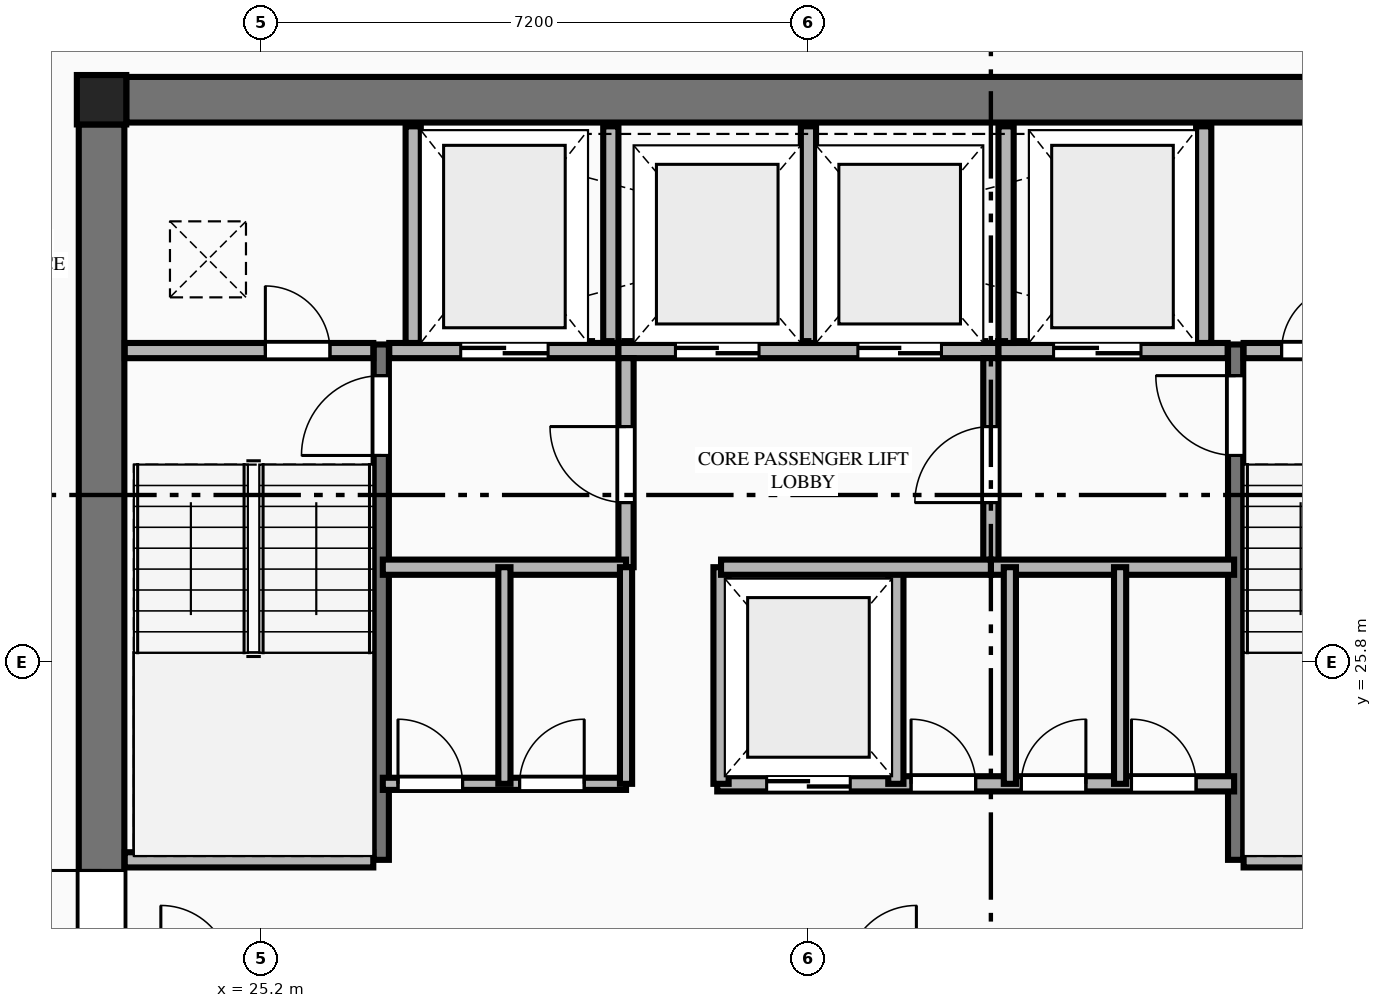
"""IFC4 building model, lengths in metres.
Left out: names, types, materials, properties, quantities, classifications, styles, units other than length and angle.
Written with IfcOpenShell. Run it as: python <this file> out.ifc"""

import sys

from ifc_helpers import new_model, si_unit, direction, frame, frame_2d, origin, origin_2d, place, context, subcontext, project, spatial, rectangle, extrude, element, fill, save


model = new_model("IFC4")
c1 = context("Model", 3, precision=1e-05, world=origin(), true_north=direction((0.0, 1.0)))
c2 = subcontext(c1, "Body", "Model", "MODEL_VIEW")
j1 = project(units=[si_unit("LENGTHUNIT", "METRE"), si_unit("PLANEANGLEUNIT", "RADIAN")], contexts=[c1])
p1 = place(None, origin())
s1 = spatial("IfcSite", under=j1, at=p1, CompositionType="ELEMENT")
p2 = place(p1, origin())
s2 = spatial("IfcBuilding", under=s1, at=p2, CompositionType="ELEMENT")
p3 = place(p2, frame((0.0, 0.0, 214.5)))
s3 = spatial("IfcBuildingStorey", under=s2, at=p3, CompositionType="ELEMENT", Elevation=214.5)
p4 = place(p3, frame((23.1, 33.2, 0.0), z_axis=(0.0, 0.0, 1.0), x_axis=(1.0, 0.0, 0.0)))
e1 = element("IfcColumn", 1, at=p4, inside=s3, PredefinedType="COLUMN", context=c2, shape_type="SweptSolid", body=[
    extrude(rectangle(XDim=0.65, YDim=0.65, at=origin_2d()), origin(), (0.0, 0.0, 1.0), 3.55),
])
p5 = place(p3, frame((23.425, 33.2, 0.0), z_axis=(0.0, 0.0, 1.0), x_axis=(1.0, 0.0, 0.0)))
e2 = element("IfcWall", 2, at=p5, inside=s3, PredefinedType="SHEAR", context=c2, shape_type="SweptSolid", body=[
    extrude(rectangle(XDim=17.95, YDim=0.6, at=frame_2d((8.975, 0.0))), origin(), (0.0, 0.0, 1.0), 3.35),
])
p6 = place(p3, frame((23.1, 18.925, 0.0), z_axis=(0.0, 0.0, 1.0), x_axis=(0.0, 1.0, 0.0)))
e3 = element("IfcWall", 3, at=p6, inside=s3, PredefinedType="SHEAR", context=c2, shape_type="SweptSolid", body=[
    extrude(rectangle(XDim=13.95, YDim=0.6, at=frame_2d((6.975, 0.0))), origin(), (0.0, 0.0, 1.0), 3.35),
])
p7 = place(p6, frame((2.915, 0.0, 0.0)))
e4 = element("IfcOpeningElement", 4, at=p7, cuts=e3, PredefinedType="OPENING", context=c2, shape_type="SweptSolid", body=[
    extrude(rectangle(XDim=1.22, YDim=2.25, at=frame_2d((0.61, 1.125))), frame((0.0, 0.31, 0.0), z_axis=(0.0, -1.0, 0.0), x_axis=(1.0, 0.0, 0.0)), (0.0, 0.0, 1.0), 0.62),
])
p8 = place(p3, frame((26.78, 23.2, 0.0), z_axis=(0.0, 0.0, 1.0), x_axis=(0.0, 1.0, 0.0)))
e5 = element("IfcWall", 5, at=p8, inside=s3, PredefinedType="SHEAR", context=c2, shape_type="SweptSolid", body=[
    extrude(rectangle(XDim=6.78, YDim=0.2, at=frame_2d((3.39, 0.0))), origin(), (0.0, 0.0, 1.0), 3.55),
])
p9 = place(p8, frame((5.32, 0.0, 0.0)))
e6 = element("IfcOpeningElement", 6, at=p9, cuts=e5, PredefinedType="OPENING", context=c2, shape_type="SweptSolid", body=[
    extrude(rectangle(XDim=1.05, YDim=2.15, at=frame_2d((0.525, 1.075))), frame((0.0, 0.11, 0.0), z_axis=(0.0, -1.0, 0.0), x_axis=(1.0, 0.0, 0.0)), (0.0, 0.0, 1.0), 0.22),
])
p10 = place(p3, frame((23.405, 23.2, 0.0), z_axis=(0.0, 0.0, 1.0), x_axis=(1.0, 0.0, 0.0)))
e7 = element("IfcWall", 7, at=p10, inside=s3, PredefinedType="PLUMBINGWALL", context=c2, shape_type="SweptSolid", body=[
    extrude(rectangle(XDim=3.27, YDim=0.2, at=frame_2d((1.635, 0.0))), origin(), (0.0, 0.0, 1.0), 3.35),
])
p11 = place(p3, frame((38.02, 23.2, 0.0), z_axis=(0.0, 0.0, 1.0), x_axis=(0.0, 1.0, 0.0)))
e8 = element("IfcWall", 8, at=p11, inside=s3, PredefinedType="SHEAR", context=c2, shape_type="SweptSolid", body=[
    extrude(rectangle(XDim=6.78, YDim=0.2, at=frame_2d((3.39, 0.0))), origin(), (0.0, 0.0, 1.0), 3.55),
])
p12 = place(p11, frame((5.32, 0.0, 0.0)))
e9 = element("IfcOpeningElement", 9, at=p12, cuts=e8, PredefinedType="OPENING", context=c2, shape_type="SweptSolid", body=[
    extrude(rectangle(XDim=1.05, YDim=2.15, at=frame_2d((0.525, 1.075))), frame((0.0, 0.11, 0.0), z_axis=(0.0, -1.0, 0.0), x_axis=(1.0, 0.0, 0.0)), (0.0, 0.0, 1.0), 0.22),
])
p13 = place(p3, frame((38.125, 23.2, 0.0), z_axis=(0.0, 0.0, 1.0), x_axis=(1.0, 0.0, 0.0)))
e10 = element("IfcWall", 10, at=p13, inside=s3, PredefinedType="PLUMBINGWALL", context=c2, shape_type="SweptSolid", body=[
    extrude(rectangle(XDim=3.27, YDim=0.2, at=frame_2d((1.635, 0.0))), origin(), (0.0, 0.0, 1.0), 3.35),
])
p14 = place(p3, frame((23.405, 29.9, 0.0), z_axis=(0.0, 0.0, 1.0), x_axis=(1.0, 0.0, 0.0)))
e11 = element("IfcWall", 11, at=p14, inside=s3, PredefinedType="PLUMBINGWALL", context=c2, shape_type="SweptSolid", body=[
    extrude(rectangle(XDim=3.27, YDim=0.2, at=frame_2d((1.635, 0.0))), origin(), (0.0, 0.0, 1.0), 3.35),
])
p15 = place(p14, frame((1.85, 0.0, 0.0)))
e12 = element("IfcOpeningElement", 12, at=p15, cuts=e11, PredefinedType="OPENING", context=c2, shape_type="SweptSolid", body=[
    extrude(rectangle(XDim=0.85, YDim=2.05, at=frame_2d((0.425, 1.025))), frame((0.0, 0.11, 0.0), z_axis=(0.0, -1.0, 0.0), x_axis=(1.0, 0.0, 0.0)), (0.0, 0.0, 1.0), 0.22),
])
p16 = place(p3, frame((26.885, 29.9, 0.0), z_axis=(0.0, 0.0, 1.0), x_axis=(1.0, 0.0, 0.0)))
e13 = element("IfcWall", 13, at=p16, inside=s3, PredefinedType="PLUMBINGWALL", context=c2, shape_type="SweptSolid", body=[
    extrude(rectangle(XDim=3.015, YDim=0.2, at=frame_2d((1.507, 0.0))), origin(), (0.0, 0.0, 1.0), 3.35),
])
p17 = place(p16, frame((0.94, 0.0, 0.0)))
e14 = element("IfcOpeningElement", 14, at=p17, cuts=e13, PredefinedType="OPENING", context=c2, shape_type="SweptSolid", body=[
    extrude(rectangle(XDim=1.15, YDim=2.2, at=frame_2d((0.575, 1.1))), frame((0.0, 0.11, 0.0), z_axis=(0.0, -1.0, 0.0), x_axis=(1.0, 0.0, 0.0)), (0.0, 0.0, 1.0), 0.22),
])
p18 = place(p3, frame((29.9, 29.9, 0.0), z_axis=(0.0, 0.0, 1.0), x_axis=(1.0, 0.0, 0.0)))
e15 = element("IfcWall", 15, at=p18, inside=s3, PredefinedType="PLUMBINGWALL", context=c2, shape_type="SweptSolid", body=[
    extrude(rectangle(XDim=5.0, YDim=0.2, at=frame_2d((2.5, 0.0))), origin(), (0.0, 0.0, 1.0), 3.35),
])
p19 = place(p18, frame((0.75, 0.0, 0.0)))
e16 = element("IfcOpeningElement", 16, at=p19, cuts=e15, PredefinedType="OPENING", context=c2, shape_type="SweptSolid", body=[
    extrude(rectangle(XDim=1.1, YDim=2.2, at=frame_2d((0.55, 1.1))), frame((0.0, 0.11, 0.0), z_axis=(0.0, -1.0, 0.0), x_axis=(1.0, 0.0, 0.0)), (0.0, 0.0, 1.0), 0.22),
])
p20 = place(p18, frame((3.15, 0.0, 0.0)))
e17 = element("IfcOpeningElement", 17, at=p20, cuts=e15, PredefinedType="OPENING", context=c2, shape_type="SweptSolid", body=[
    extrude(rectangle(XDim=1.1, YDim=2.2, at=frame_2d((0.55, 1.1))), frame((0.0, 0.11, 0.0), z_axis=(0.0, -1.0, 0.0), x_axis=(1.0, 0.0, 0.0)), (0.0, 0.0, 1.0), 0.22),
])
p21 = place(p3, frame((34.9, 29.9, 0.0), z_axis=(0.0, 0.0, 1.0), x_axis=(1.0, 0.0, 0.0)))
e18 = element("IfcWall", 18, at=p21, inside=s3, PredefinedType="PLUMBINGWALL", context=c2, shape_type="SweptSolid", body=[
    extrude(rectangle(XDim=3.015, YDim=0.2, at=frame_2d((1.508, 0.0))), origin(), (0.0, 0.0, 1.0), 3.35),
])
p22 = place(p21, frame((0.725, 0.0, 0.0)))
e19 = element("IfcOpeningElement", 19, at=p22, cuts=e18, PredefinedType="OPENING", context=c2, shape_type="SweptSolid", body=[
    extrude(rectangle(XDim=1.15, YDim=2.2, at=frame_2d((0.575, 1.1))), frame((0.0, 0.11, 0.0), z_axis=(0.0, -1.0, 0.0), x_axis=(1.0, 0.0, 0.0)), (0.0, 0.0, 1.0), 0.22),
])
p23 = place(p3, frame((38.125, 29.9, 0.0), z_axis=(0.0, 0.0, 1.0), x_axis=(1.0, 0.0, 0.0)))
e20 = element("IfcWall", 20, at=p23, inside=s3, PredefinedType="PLUMBINGWALL", context=c2, shape_type="SweptSolid", body=[
    extrude(rectangle(XDim=3.27, YDim=0.2, at=frame_2d((1.635, 0.0))), origin(), (0.0, 0.0, 1.0), 3.35),
])
p24 = place(p23, frame((0.5, 0.0, 0.0)))
e21 = element("IfcOpeningElement", 21, at=p24, cuts=e20, PredefinedType="OPENING", context=c2, shape_type="SweptSolid", body=[
    extrude(rectangle(XDim=0.85, YDim=2.05, at=frame_2d((0.425, 1.025))), frame((0.0, 0.11, 0.0), z_axis=(0.0, -1.0, 0.0), x_axis=(1.0, 0.0, 0.0)), (0.0, 0.0, 1.0), 0.22),
])
for number, where, z_axis, x_axis in (
    (22, (27.2, 30.0, 0.0), (0.0, 0.0, 1.0), (0.0, 1.0, 0.0)),
    (23, (29.8, 30.0, 0.0), (0.0, 0.0, 1.0), (0.0, 1.0, 0.0)),
    (24, (32.4, 30.0, 0.0), (0.0, 0.0, 1.0), (0.0, 1.0, 0.0)),
    (25, (35.0, 30.0, 0.0), (0.0, 0.0, 1.0), (0.0, 1.0, 0.0)),
    (26, (37.6, 30.0, 0.0), (0.0, 0.0, 1.0), (0.0, 1.0, 0.0)),
):
    element("IfcWall", number, at=place(p3, frame(where, z_axis=z_axis, x_axis=x_axis)), inside=s3, PredefinedType="PLUMBINGWALL", context=c2, shape_type="SweptSolid", body=[
        extrude(rectangle(XDim=2.85, YDim=0.2, at=frame_2d((1.425, 0.0))), origin(), (0.0, 0.0, 1.0), 3.35),
    ])
p25 = place(p3, frame((30.0, 27.05, 0.0), z_axis=(0.0, 0.0, 1.0), x_axis=(0.0, 1.0, 0.0)))
e27 = element("IfcWall", 27, at=p25, inside=s3, PredefinedType="PLUMBINGWALL", context=c2, shape_type="SweptSolid", body=[
    extrude(rectangle(XDim=2.75, YDim=0.2, at=frame_2d((1.375, 0.0))), origin(), (0.0, 0.0, 1.0), 3.35),
])
p26 = place(p25, frame((0.85, 0.0, 0.0)))
e28 = element("IfcOpeningElement", 28, at=p26, cuts=e27, PredefinedType="OPENING", context=c2, shape_type="SweptSolid", body=[
    extrude(rectangle(XDim=1.0, YDim=2.15, at=frame_2d((0.5, 1.075))), frame((0.0, 0.11, 0.0), z_axis=(0.0, -1.0, 0.0), x_axis=(1.0, 0.0, 0.0)), (0.0, 0.0, 1.0), 0.22),
])
p27 = place(p3, frame((26.8, 27.05, 0.0), z_axis=(0.0, 0.0, 1.0), x_axis=(1.0, 0.0, 0.0)))
e29 = element("IfcWall", 29, at=p27, inside=s3, PredefinedType="PLUMBINGWALL", context=c2, shape_type="SweptSolid", body=[
    extrude(rectangle(XDim=3.2, YDim=0.2, at=frame_2d((1.6, 0.0))), origin(), (0.0, 0.0, 1.0), 3.35),
])
p28 = place(p3, frame((34.8, 27.05, 0.0), z_axis=(0.0, 0.0, 1.0), x_axis=(0.0, 1.0, 0.0)))
e30 = element("IfcWall", 30, at=p28, inside=s3, PredefinedType="PLUMBINGWALL", context=c2, shape_type="SweptSolid", body=[
    extrude(rectangle(XDim=2.75, YDim=0.2, at=frame_2d((1.375, 0.0))), origin(), (0.0, 0.0, 1.0), 3.35),
])
p29 = place(p28, frame((0.85, 0.0, 0.0)))
e31 = element("IfcOpeningElement", 31, at=p29, cuts=e30, PredefinedType="OPENING", context=c2, shape_type="SweptSolid", body=[
    extrude(rectangle(XDim=1.0, YDim=2.15, at=frame_2d((0.5, 1.075))), frame((0.0, 0.11, 0.0), z_axis=(0.0, -1.0, 0.0), x_axis=(1.0, 0.0, 0.0)), (0.0, 0.0, 1.0), 0.22),
])
p30 = place(p3, frame((34.8, 27.05, 0.0), z_axis=(0.0, 0.0, 1.0), x_axis=(1.0, 0.0, 0.0)))
e32 = element("IfcWall", 32, at=p30, inside=s3, PredefinedType="PLUMBINGWALL", context=c2, shape_type="SweptSolid", body=[
    extrude(rectangle(XDim=3.2, YDim=0.2, at=frame_2d((1.6, 0.0))), origin(), (0.0, 0.0, 1.0), 3.35),
])
p31 = place(p3, frame((26.8, 24.2, 0.0), z_axis=(0.0, 0.0, 1.0), x_axis=(1.0, 0.0, 0.0)))
e33 = element("IfcWall", 33, at=p31, inside=s3, PredefinedType="PARTITIONING", context=c2, shape_type="SweptSolid", body=[
    extrude(rectangle(XDim=3.2, YDim=0.16, at=frame_2d((1.6, 0.0))), origin(), (0.0, 0.0, 1.0), 3.35),
])
p32 = place(p31, frame((0.2, 0.0, 0.0)))
e34 = element("IfcOpeningElement", 34, at=p32, cuts=e33, PredefinedType="OPENING", context=c2, shape_type="SweptSolid", body=[
    extrude(rectangle(XDim=0.85, YDim=2.05, at=frame_2d((0.425, 1.025))), frame((0.0, 0.09, 0.0), z_axis=(0.0, -1.0, 0.0), x_axis=(1.0, 0.0, 0.0)), (0.0, 0.0, 1.0), 0.18),
])
p33 = place(p31, frame((1.8, 0.0, 0.0)))
e35 = element("IfcOpeningElement", 35, at=p33, cuts=e33, PredefinedType="OPENING", context=c2, shape_type="SweptSolid", body=[
    extrude(rectangle(XDim=0.85, YDim=2.05, at=frame_2d((0.425, 1.025))), frame((0.0, 0.09, 0.0), z_axis=(0.0, -1.0, 0.0), x_axis=(1.0, 0.0, 0.0)), (0.0, 0.0, 1.0), 0.18),
])
p34 = place(p3, frame((30.0, 24.2, 0.0), z_axis=(0.0, 0.0, 1.0), x_axis=(0.0, 1.0, 0.0)))
e36 = element("IfcWall", 36, at=p34, inside=s3, PredefinedType="PARTITIONING", context=c2, shape_type="SweptSolid", body=[
    extrude(rectangle(XDim=2.85, YDim=0.16, at=frame_2d((1.425, 0.0))), origin(), (0.0, 0.0, 1.0), 3.35),
])
p35 = place(p3, frame((31.2, 24.2, 0.0), z_axis=(0.0, 0.0, 1.0), x_axis=(1.0, 0.0, 0.0)))
e37 = element("IfcWall", 37, at=p35, inside=s3, PredefinedType="PLUMBINGWALL", context=c2, shape_type="SweptSolid", body=[
    extrude(rectangle(XDim=6.8, YDim=0.2, at=frame_2d((3.4, 0.0))), origin(), (0.0, 0.0, 1.0), 3.35),
])
p36 = place(p35, frame((0.65, 0.0, 0.0)))
e38 = element("IfcOpeningElement", 38, at=p36, cuts=e37, PredefinedType="OPENING", context=c2, shape_type="SweptSolid", body=[
    extrude(rectangle(XDim=1.1, YDim=2.2, at=frame_2d((0.55, 1.1))), frame((0.0, 0.11, 0.0), z_axis=(0.0, -1.0, 0.0), x_axis=(1.0, 0.0, 0.0)), (0.0, 0.0, 1.0), 0.22),
])
p37 = place(p35, frame((2.55, 0.0, 0.0)))
e39 = element("IfcOpeningElement", 39, at=p37, cuts=e37, PredefinedType="OPENING", context=c2, shape_type="SweptSolid", body=[
    extrude(rectangle(XDim=0.85, YDim=2.05, at=frame_2d((0.425, 1.025))), frame((0.0, 0.11, 0.0), z_axis=(0.0, -1.0, 0.0), x_axis=(1.0, 0.0, 0.0)), (0.0, 0.0, 1.0), 0.22),
])
p38 = place(p35, frame((4.0, 0.0, 0.0)))
e40 = element("IfcOpeningElement", 40, at=p38, cuts=e37, PredefinedType="OPENING", context=c2, shape_type="SweptSolid", body=[
    extrude(rectangle(XDim=0.85, YDim=2.05, at=frame_2d((0.425, 1.025))), frame((0.0, 0.11, 0.0), z_axis=(0.0, -1.0, 0.0), x_axis=(1.0, 0.0, 0.0)), (0.0, 0.0, 1.0), 0.22),
])
p39 = place(p35, frame((5.45, 0.0, 0.0)))
e41 = element("IfcOpeningElement", 41, at=p39, cuts=e37, PredefinedType="OPENING", context=c2, shape_type="SweptSolid", body=[
    extrude(rectangle(XDim=0.85, YDim=2.05, at=frame_2d((0.425, 1.025))), frame((0.0, 0.11, 0.0), z_axis=(0.0, -1.0, 0.0), x_axis=(1.0, 0.0, 0.0)), (0.0, 0.0, 1.0), 0.22),
])
for number, where, z_axis, x_axis in (
    (42, (31.25, 24.2, 0.0), (0.0, 0.0, 1.0), (0.0, 1.0, 0.0)),
    (43, (33.55, 24.2, 0.0), (0.0, 0.0, 1.0), (0.0, 1.0, 0.0)),
):
    element("IfcWall", number, at=place(p3, frame(where, z_axis=z_axis, x_axis=x_axis)), inside=s3, PredefinedType="PLUMBINGWALL", context=c2, shape_type="SweptSolid", body=[
        extrude(rectangle(XDim=2.85, YDim=0.2, at=frame_2d((1.425, 0.0))), origin(), (0.0, 0.0, 1.0), 3.35),
    ])
p40 = place(p3, frame((31.25, 27.05, 0.0), z_axis=(0.0, 0.0, 1.0), x_axis=(1.0, 0.0, 0.0)))
e44 = element("IfcWall", 44, at=p40, inside=s3, PredefinedType="PLUMBINGWALL", context=c2, shape_type="SweptSolid", body=[
    extrude(rectangle(XDim=3.55, YDim=0.2, at=frame_2d((1.775, 0.0))), origin(), (0.0, 0.0, 1.0), 3.35),
])
for number, where, z_axis, x_axis in (
    (45, (28.4, 24.2, 0.0), (0.0, 0.0, 1.0), (0.0, 1.0, 0.0)),
    (46, (35.05, 24.2, 0.0), (0.0, 0.0, 1.0), (0.0, 1.0, 0.0)),
    (47, (36.5, 24.2, 0.0), (0.0, 0.0, 1.0), (0.0, 1.0, 0.0)),
):
    element("IfcWall", number, at=place(p3, frame(where, z_axis=z_axis, x_axis=x_axis)), inside=s3, PredefinedType="PARTITIONING", context=c2, shape_type="SweptSolid", body=[
        extrude(rectangle(XDim=2.85, YDim=0.16, at=frame_2d((1.425, 0.0))), origin(), (0.0, 0.0, 1.0), 3.35),
    ])
p41 = place(p7, origin())
e48 = element("IfcDoor", 48, at=p41, inside=s3, OperationType="SINGLE_SWING_RIGHT", PredefinedType="DOOR", context=c2, shape_type="SweptSolid", body=[
    extrude(rectangle(XDim=1.22, YDim=2.25, at=frame_2d((0.61, 1.125))), frame((0.0, 0.025, 0.0), z_axis=(0.0, -1.0, 0.0), x_axis=(1.0, 0.0, 0.0)), (0.0, 0.0, 1.0), 0.05),
])
fill(e4, e48)
p42 = place(p9, origin())
e49 = element("IfcDoor", 49, at=p42, inside=s3, OperationType="SINGLE_SWING_LEFT", PredefinedType="DOOR", context=c2, shape_type="SweptSolid", body=[
    extrude(rectangle(XDim=1.05, YDim=2.15, at=frame_2d((0.525, 1.075))), frame((0.0, 0.025, 0.0), z_axis=(0.0, -1.0, 0.0), x_axis=(1.0, 0.0, 0.0)), (0.0, 0.0, 1.0), 0.05),
])
fill(e6, e49)
p43 = place(p12, origin())
e50 = element("IfcDoor", 50, at=p43, inside=s3, OperationType="SINGLE_SWING_RIGHT", PredefinedType="DOOR", context=c2, shape_type="SweptSolid", body=[
    extrude(rectangle(XDim=1.05, YDim=2.15, at=frame_2d((0.525, 1.075))), frame((0.0, 0.025, 0.0), z_axis=(0.0, -1.0, 0.0), x_axis=(1.0, 0.0, 0.0)), (0.0, 0.0, 1.0), 0.05),
])
fill(e9, e50)
p44 = place(p15, origin())
e51 = element("IfcDoor", 51, at=p44, inside=s3, OperationType="SINGLE_SWING_LEFT", PredefinedType="DOOR", context=c2, shape_type="SweptSolid", body=[
    extrude(rectangle(XDim=0.85, YDim=2.05, at=frame_2d((0.425, 1.025))), frame((0.0, 0.025, 0.0), z_axis=(0.0, -1.0, 0.0), x_axis=(1.0, 0.0, 0.0)), (0.0, 0.0, 1.0), 0.05),
])
fill(e12, e51)
p45 = place(p24, origin())
e52 = element("IfcDoor", 52, at=p45, inside=s3, OperationType="SINGLE_SWING_RIGHT", PredefinedType="DOOR", context=c2, shape_type="SweptSolid", body=[
    extrude(rectangle(XDim=0.85, YDim=2.05, at=frame_2d((0.425, 1.025))), frame((0.0, 0.025, 0.0), z_axis=(0.0, -1.0, 0.0), x_axis=(1.0, 0.0, 0.0)), (0.0, 0.0, 1.0), 0.05),
])
fill(e21, e52)
p46 = place(p17, origin())
e53 = element("IfcDoor", 53, at=p46, inside=s3, OperationType="DOUBLE_DOOR_SLIDING", PredefinedType="DOOR", context=c2, shape_type="SweptSolid", body=[
    extrude(rectangle(XDim=1.15, YDim=2.2, at=frame_2d((0.575, 1.1))), frame((0.0, 0.025, 0.0), z_axis=(0.0, -1.0, 0.0), x_axis=(1.0, 0.0, 0.0)), (0.0, 0.0, 1.0), 0.05),
])
fill(e14, e53)
p47 = place(p22, origin())
e54 = element("IfcDoor", 54, at=p47, inside=s3, OperationType="DOUBLE_DOOR_SLIDING", PredefinedType="DOOR", context=c2, shape_type="SweptSolid", body=[
    extrude(rectangle(XDim=1.15, YDim=2.2, at=frame_2d((0.575, 1.1))), frame((0.0, 0.025, 0.0), z_axis=(0.0, -1.0, 0.0), x_axis=(1.0, 0.0, 0.0)), (0.0, 0.0, 1.0), 0.05),
])
fill(e19, e54)
p48 = place(p19, origin())
e55 = element("IfcDoor", 55, at=p48, inside=s3, OperationType="DOUBLE_DOOR_SLIDING", PredefinedType="DOOR", context=c2, shape_type="SweptSolid", body=[
    extrude(rectangle(XDim=1.1, YDim=2.2, at=frame_2d((0.55, 1.1))), frame((0.0, 0.025, 0.0), z_axis=(0.0, -1.0, 0.0), x_axis=(1.0, 0.0, 0.0)), (0.0, 0.0, 1.0), 0.05),
])
fill(e16, e55)
p49 = place(p20, origin())
e56 = element("IfcDoor", 56, at=p49, inside=s3, OperationType="DOUBLE_DOOR_SLIDING", PredefinedType="DOOR", context=c2, shape_type="SweptSolid", body=[
    extrude(rectangle(XDim=1.1, YDim=2.2, at=frame_2d((0.55, 1.1))), frame((0.0, 0.025, 0.0), z_axis=(0.0, -1.0, 0.0), x_axis=(1.0, 0.0, 0.0)), (0.0, 0.0, 1.0), 0.05),
])
fill(e17, e56)
p50 = place(p26, origin())
e57 = element("IfcDoor", 57, at=p50, inside=s3, OperationType="SINGLE_SWING_RIGHT", PredefinedType="DOOR", context=c2, shape_type="SweptSolid", body=[
    extrude(rectangle(XDim=1.0, YDim=2.15, at=frame_2d((0.5, 1.075))), frame((0.0, 0.025, 0.0), z_axis=(0.0, -1.0, 0.0), x_axis=(1.0, 0.0, 0.0)), (0.0, 0.0, 1.0), 0.05),
])
fill(e28, e57)
p51 = place(p29, origin())
e58 = element("IfcDoor", 58, at=p51, inside=s3, OperationType="SINGLE_SWING_LEFT", PredefinedType="DOOR", context=c2, shape_type="SweptSolid", body=[
    extrude(rectangle(XDim=1.0, YDim=2.15, at=frame_2d((0.5, 1.075))), frame((0.0, 0.025, 0.0), z_axis=(0.0, -1.0, 0.0), x_axis=(1.0, 0.0, 0.0)), (0.0, 0.0, 1.0), 0.05),
])
fill(e31, e58)
p52 = place(p36, origin())
e59 = element("IfcDoor", 59, at=p52, inside=s3, OperationType="DOUBLE_DOOR_SLIDING", PredefinedType="DOOR", context=c2, shape_type="SweptSolid", body=[
    extrude(rectangle(XDim=1.1, YDim=2.2, at=frame_2d((0.55, 1.1))), frame((0.0, 0.025, 0.0), z_axis=(0.0, -1.0, 0.0), x_axis=(1.0, 0.0, 0.0)), (0.0, 0.0, 1.0), 0.05),
])
fill(e38, e59)
p53 = place(p32, origin())
e60 = element("IfcDoor", 60, at=p53, inside=s3, OperationType="SINGLE_SWING_LEFT", PredefinedType="DOOR", context=c2, shape_type="SweptSolid", body=[
    extrude(rectangle(XDim=0.85, YDim=2.05, at=frame_2d((0.425, 1.025))), frame((0.0, 0.025, 0.0), z_axis=(0.0, -1.0, 0.0), x_axis=(1.0, 0.0, 0.0)), (0.0, 0.0, 1.0), 0.05),
])
fill(e34, e60)
p54 = place(p33, origin())
e61 = element("IfcDoor", 61, at=p54, inside=s3, OperationType="SINGLE_SWING_RIGHT", PredefinedType="DOOR", context=c2, shape_type="SweptSolid", body=[
    extrude(rectangle(XDim=0.85, YDim=2.05, at=frame_2d((0.425, 1.025))), frame((0.0, 0.025, 0.0), z_axis=(0.0, -1.0, 0.0), x_axis=(1.0, 0.0, 0.0)), (0.0, 0.0, 1.0), 0.05),
])
fill(e35, e61)
p55 = place(p37, origin())
e62 = element("IfcDoor", 62, at=p55, inside=s3, OperationType="SINGLE_SWING_LEFT", PredefinedType="DOOR", context=c2, shape_type="SweptSolid", body=[
    extrude(rectangle(XDim=0.85, YDim=2.05, at=frame_2d((0.425, 1.025))), frame((0.0, 0.025, 0.0), z_axis=(0.0, -1.0, 0.0), x_axis=(1.0, 0.0, 0.0)), (0.0, 0.0, 1.0), 0.05),
])
fill(e39, e62)
p56 = place(p38, origin())
e63 = element("IfcDoor", 63, at=p56, inside=s3, OperationType="SINGLE_SWING_RIGHT", PredefinedType="DOOR", context=c2, shape_type="SweptSolid", body=[
    extrude(rectangle(XDim=0.85, YDim=2.05, at=frame_2d((0.425, 1.025))), frame((0.0, 0.025, 0.0), z_axis=(0.0, -1.0, 0.0), x_axis=(1.0, 0.0, 0.0)), (0.0, 0.0, 1.0), 0.05),
])
fill(e40, e63)
p57 = place(p39, origin())
e64 = element("IfcDoor", 64, at=p57, inside=s3, OperationType="SINGLE_SWING_LEFT", PredefinedType="DOOR", context=c2, shape_type="SweptSolid", body=[
    extrude(rectangle(XDim=0.85, YDim=2.05, at=frame_2d((0.425, 1.025))), frame((0.0, 0.025, 0.0), z_axis=(0.0, -1.0, 0.0), x_axis=(1.0, 0.0, 0.0)), (0.0, 0.0, 1.0), 0.05),
])
fill(e41, e64)
save(model, sys.argv[1])
